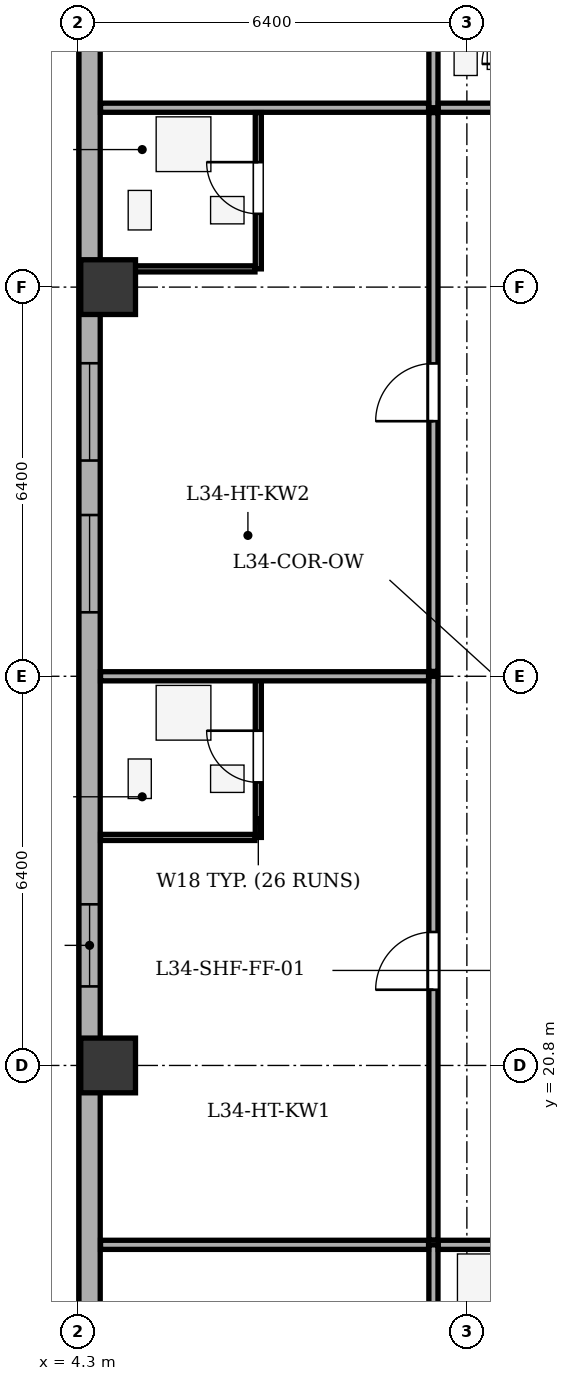
"""IFC4 building model, lengths in metres.
Left out: names, types, materials, properties, quantities, classifications, styles, units other than length and angle.
Written with IfcOpenShell. Run it as: python <this file> out.ifc"""

import sys

from ifc_helpers import new_model, si_unit, direction, frame, frame_2d, origin, origin_2d, place, context, subcontext, project, spatial, rectangle, extrude, element, fill, save


model = new_model("IFC4")
c1 = context("Model", 3, precision=1e-05, world=origin(), true_north=direction((0.0, 1.0)))
c2 = subcontext(c1, "Body", "Model", "MODEL_VIEW")
j1 = project(units=[si_unit("LENGTHUNIT", "METRE"), si_unit("PLANEANGLEUNIT", "RADIAN")], contexts=[c1])
p1 = place(None, origin())
s1 = spatial("IfcSite", under=j1, at=p1, CompositionType="ELEMENT")
p2 = place(p1, origin())
s2 = spatial("IfcBuilding", under=s1, at=p2, CompositionType="ELEMENT")
p3 = place(p2, frame((0.0, 0.0, 137.8)))
s3 = spatial("IfcBuildingStorey", under=s2, at=p3, CompositionType="ELEMENT", Elevation=137.8)
for number, where, z_axis, x_axis in (
    (1, (4.8, 20.8, 0.0), (0.0, 0.0, 1.0), (1.0, 0.0, 0.0)),
    (2, (4.8, 33.6, 0.0), (0.0, 0.0, 1.0), (1.0, 0.0, 0.0)),
):
    element("IfcColumn", number, at=place(p3, frame(where, z_axis=z_axis, x_axis=x_axis)), inside=s3, PredefinedType="COLUMN", context=c2, shape_type="SweptSolid", body=[
        extrude(rectangle(XDim=0.9, YDim=0.9, at=origin_2d()), origin(), (0.0, 0.0, 1.0), 3.5),
    ])
p4 = place(p3, frame((4.495, 6.5, 0.0), z_axis=(0.0, 0.0, 1.0), x_axis=(0.0, 1.0, 0.0)))
e3 = element("IfcWall", 3, at=p4, inside=s3, PredefinedType="STANDARD", context=c2, shape_type="SweptSolid", body=[
    extrude(rectangle(XDim=35.0, YDim=0.35, at=frame_2d((17.5, 0.0))), origin(), (0.0, 0.0, 1.0), 2.435),
])
p5 = place(p4, frame((2.613, 0.0, 0.75)))
e4 = element("IfcOpeningElement", 4, at=p5, cuts=e3, PredefinedType="OPENING", context=c2, shape_type="SweptSolid", body=[
    extrude(rectangle(XDim=1.6, YDim=1.565, at=frame_2d((0.8, 0.782))), frame((0.0, 0.185, 0.0), z_axis=(0.0, -1.0, 0.0), x_axis=(1.0, 0.0, 0.0)), (0.0, 0.0, 1.0), 0.37),
])
p6 = place(p4, frame((7.187, 0.0, 0.75)))
e5 = element("IfcOpeningElement", 5, at=p6, cuts=e3, PredefinedType="OPENING", context=c2, shape_type="SweptSolid", body=[
    extrude(rectangle(XDim=2.1, YDim=1.565, at=frame_2d((1.05, 0.782))), frame((0.0, 0.185, 0.0), z_axis=(0.0, -1.0, 0.0), x_axis=(1.0, 0.0, 0.0)), (0.0, 0.0, 1.0), 0.37),
])
p7 = place(p4, frame((15.6, 0.0, 0.75)))
e6 = element("IfcOpeningElement", 6, at=p7, cuts=e3, PredefinedType="OPENING", context=c2, shape_type="SweptSolid", body=[
    extrude(rectangle(XDim=1.35, YDim=1.565, at=frame_2d((0.675, 0.782))), frame((0.0, 0.185, 0.0), z_axis=(0.0, -1.0, 0.0), x_axis=(1.0, 0.0, 0.0)), (0.0, 0.0, 1.0), 0.37),
])
p8 = place(p4, frame((21.752, 0.0, 0.75)))
e7 = element("IfcOpeningElement", 7, at=p8, cuts=e3, PredefinedType="OPENING", context=c2, shape_type="SweptSolid", body=[
    extrude(rectangle(XDim=1.6, YDim=1.565, at=frame_2d((0.8, 0.782))), frame((0.0, 0.185, 0.0), z_axis=(0.0, -1.0, 0.0), x_axis=(1.0, 0.0, 0.0)), (0.0, 0.0, 1.0), 0.37),
])
p9 = place(p4, frame((24.248, 0.0, 0.75)))
e8 = element("IfcOpeningElement", 8, at=p9, cuts=e3, PredefinedType="OPENING", context=c2, shape_type="SweptSolid", body=[
    extrude(rectangle(XDim=1.6, YDim=1.565, at=frame_2d((0.8, 0.782))), frame((0.0, 0.185, 0.0), z_axis=(0.0, -1.0, 0.0), x_axis=(1.0, 0.0, 0.0)), (0.0, 0.0, 1.0), 0.37),
])
p10 = place(p4, frame((31.575, 0.0, 0.75)))
e9 = element("IfcOpeningElement", 9, at=p10, cuts=e3, PredefinedType="OPENING", context=c2, shape_type="SweptSolid", body=[
    extrude(rectangle(XDim=1.6, YDim=1.565, at=frame_2d((0.8, 0.782))), frame((0.0, 0.185, 0.0), z_axis=(0.0, -1.0, 0.0), x_axis=(1.0, 0.0, 0.0)), (0.0, 0.0, 1.0), 0.37),
])
p11 = place(p3, frame((10.15, 1.875, 0.0), z_axis=(0.0, 0.0, 1.0), x_axis=(0.0, 1.0, 0.0)))
e10 = element("IfcWall", 10, at=p11, inside=s3, PredefinedType="PARTITIONING", context=c2, shape_type="SweptSolid", body=[
    extrude(rectangle(XDim=15.975, YDim=0.15, at=frame_2d((7.988, 0.0))), origin(), (0.0, 0.0, 1.0), 3.05),
])
p12 = place(p3, frame((10.23, 17.85, 0.0), z_axis=(0.0, 0.0, 1.0), x_axis=(1.0, 0.0, 0.0)))
e11 = element("IfcWall", 11, at=p12, inside=s3, PredefinedType="PARTITIONING", context=c2, shape_type="SweptSolid", body=[
    extrude(rectangle(XDim=1.57, YDim=0.15, at=frame_2d((0.785, 0.0))), origin(), (0.0, 0.0, 1.0), 3.05),
])
p13 = place(p3, frame((10.15, 36.55, 0.0), z_axis=(0.0, 0.0, 1.0), x_axis=(0.0, 1.0, 0.0)))
e12 = element("IfcWall", 12, at=p13, inside=s3, PredefinedType="PARTITIONING", context=c2, shape_type="SweptSolid", body=[
    extrude(rectangle(XDim=9.575, YDim=0.15, at=frame_2d((4.788, 0.0))), origin(), (0.0, 0.0, 1.0), 3.05),
])
p14 = place(p3, frame((10.23, 36.55, 0.0), z_axis=(0.0, 0.0, 1.0), x_axis=(1.0, 0.0, 0.0)))
e13 = element("IfcWall", 13, at=p14, inside=s3, PredefinedType="PARTITIONING", context=c2, shape_type="SweptSolid", body=[
    extrude(rectangle(XDim=1.57, YDim=0.15, at=frame_2d((0.785, 0.0))), origin(), (0.0, 0.0, 1.0), 3.05),
])
for number, where, z_axis, x_axis in (
    (14, (4.675, 17.85, 0.0), (0.0, 0.0, 1.0), (1.0, 0.0, 0.0)),
    (15, (4.675, 36.55, 0.0), (0.0, 0.0, 1.0), (1.0, 0.0, 0.0)),
):
    element("IfcWall", number, at=place(p3, frame(where, z_axis=z_axis, x_axis=x_axis)), inside=s3, PredefinedType="PARTITIONING", context=c2, shape_type="SweptSolid", body=[
        extrude(rectangle(XDim=5.395, YDim=0.15, at=frame_2d((2.698, 0.0))), origin(), (0.0, 0.0, 1.0), 3.05),
    ])
p15 = place(p3, frame((10.15, 17.93, 0.0), z_axis=(0.0, 0.0, 1.0), x_axis=(0.0, 1.0, 0.0)))
e16 = element("IfcWall", 16, at=p15, inside=s3, PredefinedType="PARTITIONING", context=c2, shape_type="SweptSolid", body=[
    extrude(rectangle(XDim=9.27, YDim=0.15, at=frame_2d((4.635, 0.0))), origin(), (0.0, 0.0, 1.0), 3.05),
])
p16 = place(p15, frame((4.115, 0.0, 0.0)))
e17 = element("IfcOpeningElement", 17, at=p16, cuts=e16, PredefinedType="OPENING", context=c2, shape_type="SweptSolid", body=[
    extrude(rectangle(XDim=0.95, YDim=2.1, at=frame_2d((0.475, 1.05))), frame((0.0, 0.085, 0.0), z_axis=(0.0, -1.0, 0.0), x_axis=(1.0, 0.0, 0.0)), (0.0, 0.0, 1.0), 0.17),
])
p17 = place(p3, frame((7.27, 24.55, 0.0), z_axis=(0.0, 0.0, 1.0), x_axis=(0.0, 1.0, 0.0)))
e18 = element("IfcWall", 18, at=p17, inside=s3, PredefinedType="PARTITIONING", context=c2, shape_type="SweptSolid", body=[
    extrude(rectangle(XDim=2.65, YDim=0.1, at=frame_2d((1.325, 0.0))), origin(), (0.0, 0.0, 1.0), 3.05),
])
p18 = place(p17, frame((0.905, 0.0, 0.0)))
e19 = element("IfcOpeningElement", 19, at=p18, cuts=e18, PredefinedType="OPENING", context=c2, shape_type="SweptSolid", body=[
    extrude(rectangle(XDim=0.85, YDim=2.05, at=frame_2d((0.425, 1.025))), frame((0.0, 0.06, 0.0), z_axis=(0.0, -1.0, 0.0), x_axis=(1.0, 0.0, 0.0)), (0.0, 0.0, 1.0), 0.12),
])
p19 = place(p3, frame((4.675, 24.55, 0.0), z_axis=(0.0, 0.0, 1.0), x_axis=(1.0, 0.0, 0.0)))
e20 = element("IfcWall", 20, at=p19, inside=s3, PredefinedType="PARTITIONING", context=c2, shape_type="SweptSolid", body=[
    extrude(rectangle(XDim=2.54, YDim=0.1, at=frame_2d((1.27, 0.0))), origin(), (0.0, 0.0, 1.0), 3.05),
])
p20 = place(p3, frame((4.675, 27.2, 0.0), z_axis=(0.0, 0.0, 1.0), x_axis=(1.0, 0.0, 0.0)))
e21 = element("IfcWall", 21, at=p20, inside=s3, PredefinedType="PARTITIONING", context=c2, shape_type="SweptSolid", body=[
    extrude(rectangle(XDim=5.395, YDim=0.15, at=frame_2d((2.698, 0.0))), origin(), (0.0, 0.0, 1.0), 3.05),
])
p21 = place(p3, frame((10.15, 27.28, 0.0), z_axis=(0.0, 0.0, 1.0), x_axis=(0.0, 1.0, 0.0)))
e22 = element("IfcWall", 22, at=p21, inside=s3, PredefinedType="PARTITIONING", context=c2, shape_type="SweptSolid", body=[
    extrude(rectangle(XDim=9.19, YDim=0.15, at=frame_2d((4.595, 0.0))), origin(), (0.0, 0.0, 1.0), 3.05),
])
p22 = place(p21, frame((4.115, 0.0, 0.0)))
e23 = element("IfcOpeningElement", 23, at=p22, cuts=e22, PredefinedType="OPENING", context=c2, shape_type="SweptSolid", body=[
    extrude(rectangle(XDim=0.95, YDim=2.1, at=frame_2d((0.475, 1.05))), frame((0.0, 0.085, 0.0), z_axis=(0.0, -1.0, 0.0), x_axis=(1.0, 0.0, 0.0)), (0.0, 0.0, 1.0), 0.17),
])
p23 = place(p3, frame((7.27, 33.9, 0.0), z_axis=(0.0, 0.0, 1.0), x_axis=(0.0, 1.0, 0.0)))
e24 = element("IfcWall", 24, at=p23, inside=s3, PredefinedType="PARTITIONING", context=c2, shape_type="SweptSolid", body=[
    extrude(rectangle(XDim=2.57, YDim=0.1, at=frame_2d((1.285, 0.0))), origin(), (0.0, 0.0, 1.0), 3.05),
])
p24 = place(p23, frame((0.905, 0.0, 0.0)))
e25 = element("IfcOpeningElement", 25, at=p24, cuts=e24, PredefinedType="OPENING", context=c2, shape_type="SweptSolid", body=[
    extrude(rectangle(XDim=0.85, YDim=2.05, at=frame_2d((0.425, 1.025))), frame((0.0, 0.06, 0.0), z_axis=(0.0, -1.0, 0.0), x_axis=(1.0, 0.0, 0.0)), (0.0, 0.0, 1.0), 0.12),
])
p25 = place(p3, frame((4.675, 33.9, 0.0), z_axis=(0.0, 0.0, 1.0), x_axis=(1.0, 0.0, 0.0)))
e26 = element("IfcWall", 26, at=p25, inside=s3, PredefinedType="PARTITIONING", context=c2, shape_type="SweptSolid", body=[
    extrude(rectangle(XDim=2.54, YDim=0.1, at=frame_2d((1.27, 0.0))), origin(), (0.0, 0.0, 1.0), 3.05),
])
p26 = place(p7, origin())
e27 = element("IfcWindow", 27, at=p26, inside=s3, PartitioningType="SINGLE_PANEL", PredefinedType="WINDOW", context=c2, shape_type="SweptSolid", body=[
    extrude(rectangle(XDim=1.35, YDim=1.565, at=frame_2d((0.675, 0.782))), frame((0.0, -0.01, 0.0), z_axis=(0.0, -1.0, 0.0), x_axis=(1.0, 0.0, 0.0)), (0.0, 0.0, 1.0), 0.06),
])
fill(e6, e27)
p27 = place(p8, origin())
e28 = element("IfcWindow", 28, at=p27, inside=s3, PartitioningType="SINGLE_PANEL", PredefinedType="WINDOW", context=c2, shape_type="SweptSolid", body=[
    extrude(rectangle(XDim=1.6, YDim=1.565, at=frame_2d((0.8, 0.782))), frame((0.0, -0.01, 0.0), z_axis=(0.0, -1.0, 0.0), x_axis=(1.0, 0.0, 0.0)), (0.0, 0.0, 1.0), 0.06),
])
fill(e7, e28)
p28 = place(p9, origin())
e29 = element("IfcWindow", 29, at=p28, inside=s3, PartitioningType="SINGLE_PANEL", PredefinedType="WINDOW", context=c2, shape_type="SweptSolid", body=[
    extrude(rectangle(XDim=1.6, YDim=1.565, at=frame_2d((0.8, 0.782))), frame((0.0, -0.01, 0.0), z_axis=(0.0, -1.0, 0.0), x_axis=(1.0, 0.0, 0.0)), (0.0, 0.0, 1.0), 0.06),
])
fill(e8, e29)
p29 = place(p18, origin())
e30 = element("IfcDoor", 30, at=p29, inside=s3, OperationType="SINGLE_SWING_RIGHT", PredefinedType="DOOR", context=c2, shape_type="SweptSolid", body=[
    extrude(rectangle(XDim=0.85, YDim=2.05, at=frame_2d((0.425, 1.025))), frame((0.0, 0.025, 0.0), z_axis=(0.0, -1.0, 0.0), x_axis=(1.0, 0.0, 0.0)), (0.0, 0.0, 1.0), 0.05),
])
fill(e19, e30)
p30 = place(p16, origin())
e31 = element("IfcDoor", 31, at=p30, inside=s3, OperationType="SINGLE_SWING_LEFT", PredefinedType="DOOR", context=c2, shape_type="SweptSolid", body=[
    extrude(rectangle(XDim=0.95, YDim=2.1, at=frame_2d((0.475, 1.05))), frame((0.0, 0.025, 0.0), z_axis=(0.0, -1.0, 0.0), x_axis=(1.0, 0.0, 0.0)), (0.0, 0.0, 1.0), 0.05),
])
fill(e17, e31)
p31 = place(p24, origin())
e32 = element("IfcDoor", 32, at=p31, inside=s3, OperationType="SINGLE_SWING_RIGHT", PredefinedType="DOOR", context=c2, shape_type="SweptSolid", body=[
    extrude(rectangle(XDim=0.85, YDim=2.05, at=frame_2d((0.425, 1.025))), frame((0.0, 0.025, 0.0), z_axis=(0.0, -1.0, 0.0), x_axis=(1.0, 0.0, 0.0)), (0.0, 0.0, 1.0), 0.05),
])
fill(e25, e32)
p32 = place(p22, origin())
e33 = element("IfcDoor", 33, at=p32, inside=s3, OperationType="SINGLE_SWING_LEFT", PredefinedType="DOOR", context=c2, shape_type="SweptSolid", body=[
    extrude(rectangle(XDim=0.95, YDim=2.1, at=frame_2d((0.475, 1.05))), frame((0.0, 0.025, 0.0), z_axis=(0.0, -1.0, 0.0), x_axis=(1.0, 0.0, 0.0)), (0.0, 0.0, 1.0), 0.05),
])
fill(e23, e33)
save(model, sys.argv[1])
